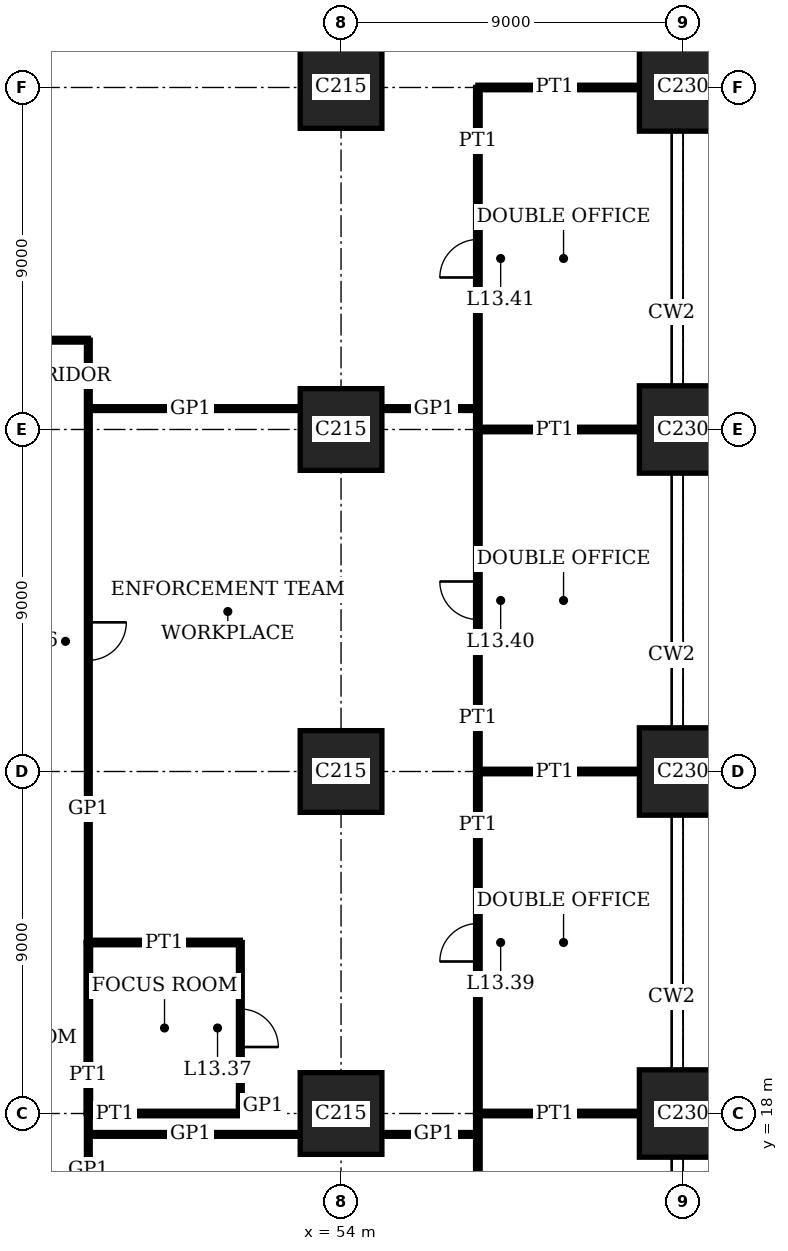
"""IFC4 building model, lengths in metres.
Left out: names, types, materials, properties, quantities, classifications, styles, units other than length and angle.
Written with IfcOpenShell. Run it as: python <this file> out.ifc"""

import sys

from ifc_helpers import new_model, si_unit, direction, frame, frame_2d, origin, origin_2d, place, context, subcontext, project, spatial, rectangle, extrude, element, fill, save


model = new_model("IFC4")
c1 = context("Model", 3, precision=1e-05, world=origin(), true_north=direction((0.0, 1.0)))
c2 = subcontext(c1, "Body", "Model", "MODEL_VIEW")
j1 = project(units=[si_unit("LENGTHUNIT", "METRE"), si_unit("PLANEANGLEUNIT", "RADIAN")], contexts=[c1])
p1 = place(None, origin())
s1 = spatial("IfcSite", under=j1, at=p1, CompositionType="ELEMENT")
p2 = place(p1, origin())
s2 = spatial("IfcBuilding", under=s1, at=p2, CompositionType="ELEMENT")
p3 = place(p2, frame((0.0, 0.0, 55.8)))
s3 = spatial("IfcBuildingStorey", under=s2, at=p3, CompositionType="ELEMENT", Elevation=55.8)
for number, where, z_axis, x_axis in (
    (1, (54.0, 18.0, 0.0), (0.0, 0.0, 1.0), (1.0, 0.0, 0.0)),
    (2, (54.0, 27.0, 0.0), (0.0, 0.0, 1.0), (1.0, 0.0, 0.0)),
    (3, (54.0, 36.0, 0.0), (0.0, 0.0, 1.0), (1.0, 0.0, 0.0)),
    (4, (54.0, 45.0, 0.0), (0.0, 0.0, 1.0), (1.0, 0.0, 0.0)),
):
    element("IfcColumn", number, at=place(p3, frame(where, z_axis=z_axis, x_axis=x_axis)), inside=s3, PredefinedType="COLUMN", context=c2, shape_type="SweptSolid", body=[
        extrude(rectangle(XDim=2.15, YDim=2.15, at=origin_2d()), origin(), (0.0, 0.0, 1.0), 4.0),
    ])
for number, where, z_axis, x_axis in (
    (5, (63.0, 18.0, 0.0), (0.0, 0.0, 1.0), (1.0, 0.0, 0.0)),
    (6, (63.0, 27.0, 0.0), (0.0, 0.0, 1.0), (1.0, 0.0, 0.0)),
    (7, (63.0, 36.0, 0.0), (0.0, 0.0, 1.0), (1.0, 0.0, 0.0)),
    (8, (63.0, 45.0, 0.0), (0.0, 0.0, 1.0), (1.0, 0.0, 0.0)),
):
    element("IfcColumn", number, at=place(p3, frame(where, z_axis=z_axis, x_axis=x_axis)), inside=s3, PredefinedType="COLUMN", context=c2, shape_type="SweptSolid", body=[
        extrude(rectangle(XDim=2.3, YDim=2.3, at=origin_2d()), origin(), (0.0, 0.0, 1.0), 4.0),
    ])
p4 = place(p3, frame((47.35, 17.45, 0.0), z_axis=(0.0, 0.0, 1.0), x_axis=(1.0, 0.0, 0.0)))
e9 = element("IfcWall", 9, at=p4, inside=s3, PredefinedType="PARTITIONING", context=c2, shape_type="SweptSolid", body=[
    extrude(rectangle(XDim=5.575, YDim=0.1, at=frame_2d((2.788, 0.0))), origin(), (0.0, 0.0, 1.0), 3.75),
])
p5 = place(p3, frame((55.075, 17.45, 0.0), z_axis=(0.0, 0.0, 1.0), x_axis=(1.0, 0.0, 0.0)))
e10 = element("IfcWall", 10, at=p5, inside=s3, PredefinedType="PARTITIONING", context=c2, shape_type="SweptSolid", body=[
    extrude(rectangle(XDim=2.535, YDim=0.1, at=frame_2d((1.268, 0.0))), origin(), (0.0, 0.0, 1.0), 3.75),
])
p6 = place(p3, frame((57.6, 18.0, 0.0), z_axis=(0.0, 0.0, 1.0), x_axis=(1.0, 0.0, 0.0)))
e11 = element("IfcWall", 11, at=p6, inside=s3, PredefinedType="PARTITIONING", context=c2, shape_type="SweptSolid", body=[
    extrude(rectangle(XDim=4.25, YDim=0.12, at=frame_2d((2.125, 0.0))), origin(), (0.0, 0.0, 1.0), 3.05),
])
p7 = place(p3, frame((47.35, 18.0, 0.0), z_axis=(0.0, 0.0, 1.0), x_axis=(1.0, 0.0, 0.0)))
e12 = element("IfcWall", 12, at=p7, inside=s3, PredefinedType="PARTITIONING", context=c2, shape_type="SweptSolid", body=[
    extrude(rectangle(XDim=4.0, YDim=0.12, at=frame_2d((2.0, 0.0))), origin(), (0.0, 0.0, 1.0), 3.05),
])
p8 = place(p3, frame((47.35, 22.5, 0.0), z_axis=(0.0, 0.0, 1.0), x_axis=(1.0, 0.0, 0.0)))
e13 = element("IfcWall", 13, at=p8, inside=s3, PredefinedType="PARTITIONING", context=c2, shape_type="SweptSolid", body=[
    extrude(rectangle(XDim=4.0, YDim=0.12, at=frame_2d((2.0, 0.0))), origin(), (0.0, 0.0, 1.0), 3.1),
])
for number, where, z_axis, x_axis in (
    (14, (57.6, 27.0, 0.0), (0.0, 0.0, 1.0), (1.0, 0.0, 0.0)),
    (15, (57.6, 36.0, 0.0), (0.0, 0.0, 1.0), (1.0, 0.0, 0.0)),
):
    element("IfcWall", number, at=place(p3, frame(where, z_axis=z_axis, x_axis=x_axis)), inside=s3, PredefinedType="PARTITIONING", context=c2, shape_type="SweptSolid", body=[
        extrude(rectangle(XDim=4.25, YDim=0.12, at=frame_2d((2.125, 0.0))), origin(), (0.0, 0.0, 1.0), 3.05),
    ])
p9 = place(p3, frame((47.35, 36.55, 0.0), z_axis=(0.0, 0.0, 1.0), x_axis=(1.0, 0.0, 0.0)))
e16 = element("IfcWall", 16, at=p9, inside=s3, PredefinedType="PARTITIONING", context=c2, shape_type="SweptSolid", body=[
    extrude(rectangle(XDim=5.575, YDim=0.1, at=frame_2d((2.788, 0.0))), origin(), (0.0, 0.0, 1.0), 3.75),
])
p10 = place(p3, frame((55.075, 36.55, 0.0), z_axis=(0.0, 0.0, 1.0), x_axis=(1.0, 0.0, 0.0)))
e17 = element("IfcWall", 17, at=p10, inside=s3, PredefinedType="PARTITIONING", context=c2, shape_type="SweptSolid", body=[
    extrude(rectangle(XDim=2.535, YDim=0.1, at=frame_2d((1.268, 0.0))), origin(), (0.0, 0.0, 1.0), 3.75),
])
p11 = place(p3, frame((22.5, 38.35, 0.0), z_axis=(0.0, 0.0, 1.0), x_axis=(1.0, 0.0, 0.0)))
e18 = element("IfcWall", 18, at=p11, inside=s3, PredefinedType="PARTITIONING", context=c2, shape_type="SweptSolid", body=[
    extrude(rectangle(XDim=24.85, YDim=0.1, at=frame_2d((12.425, 0.0))), origin(), (0.0, 0.0, 1.0), 3.75),
])
p12 = place(p3, frame((57.6, 45.0, 0.0), z_axis=(0.0, 0.0, 1.0), x_axis=(1.0, 0.0, 0.0)))
e19 = element("IfcWall", 19, at=p12, inside=s3, PredefinedType="PARTITIONING", context=c2, shape_type="SweptSolid", body=[
    extrude(rectangle(XDim=4.25, YDim=0.12, at=frame_2d((2.125, 0.0))), origin(), (0.0, 0.0, 1.0), 3.05),
])
p13 = place(p3, frame((47.35, 18.0, 0.0), z_axis=(0.0, 0.0, 1.0), x_axis=(0.0, 1.0, 0.0)))
e20 = element("IfcWall", 20, at=p13, inside=s3, PredefinedType="PARTITIONING", context=c2, shape_type="SweptSolid", body=[
    extrude(rectangle(XDim=4.5, YDim=0.12, at=frame_2d((2.25, 0.0))), origin(), (0.0, 0.0, 1.0), 3.75),
])
p14 = place(p3, frame((47.35, 15.65, 0.0), z_axis=(0.0, 0.0, 1.0), x_axis=(0.0, 1.0, 0.0)))
e21 = element("IfcWall", 21, at=p14, inside=s3, PredefinedType="PARTITIONING", context=c2, shape_type="SweptSolid", body=[
    extrude(rectangle(XDim=2.35, YDim=0.1, at=frame_2d((1.175, 0.0))), origin(), (0.0, 0.0, 1.0), 3.75),
])
p15 = place(p3, frame((47.35, 22.5, 0.0), z_axis=(0.0, 0.0, 1.0), x_axis=(0.0, 1.0, 0.0)))
e22 = element("IfcWall", 22, at=p15, inside=s3, PredefinedType="PARTITIONING", context=c2, shape_type="SweptSolid", body=[
    extrude(rectangle(XDim=15.85, YDim=0.1, at=frame_2d((7.925, 0.0))), origin(), (0.0, 0.0, 1.0), 3.75),
])
p16 = place(p15, frame((7.425, 0.0, 0.0)))
e23 = element("IfcOpeningElement", 23, at=p16, cuts=e22, PredefinedType="OPENING", context=c2, shape_type="SweptSolid", body=[
    extrude(rectangle(XDim=1.0, YDim=2.4, at=frame_2d((0.5, 1.2))), frame((0.0, 0.06, 0.0), z_axis=(0.0, -1.0, 0.0), x_axis=(1.0, 0.0, 0.0)), (0.0, 0.0, 1.0), 0.12),
])
p17 = place(p3, frame((51.35, 18.0, 0.0), z_axis=(0.0, 0.0, 1.0), x_axis=(0.0, 1.0, 0.0)))
e24 = element("IfcWall", 24, at=p17, inside=s3, PredefinedType="PARTITIONING", context=c2, shape_type="SweptSolid", body=[
    extrude(rectangle(XDim=4.5, YDim=0.1, at=frame_2d((2.25, 0.0))), origin(), (0.0, 0.0, 1.0), 3.75),
])
p18 = place(p17, frame((1.75, 0.0, 0.0)))
e25 = element("IfcOpeningElement", 25, at=p18, cuts=e24, PredefinedType="OPENING", context=c2, shape_type="SweptSolid", body=[
    extrude(rectangle(XDim=1.0, YDim=2.4, at=frame_2d((0.5, 1.2))), frame((0.0, 0.06, 0.0), z_axis=(0.0, -1.0, 0.0), x_axis=(1.0, 0.0, 0.0)), (0.0, 0.0, 1.0), 0.12),
])
p19 = place(p3, frame((57.6, 9.0, 0.0), z_axis=(0.0, 0.0, 1.0), x_axis=(0.0, 1.0, 0.0)))
e26 = element("IfcWall", 26, at=p19, inside=s3, PredefinedType="PARTITIONING", context=c2, shape_type="SweptSolid", body=[
    extrude(rectangle(XDim=9.0, YDim=0.12, at=frame_2d((4.5, 0.0))), origin(), (0.0, 0.0, 1.0), 3.75),
])
p20 = place(p19, frame((4.0, 0.0, 0.0)))
e27 = element("IfcOpeningElement", 27, at=p20, cuts=e26, PredefinedType="OPENING", context=c2, shape_type="SweptSolid", body=[
    extrude(rectangle(XDim=1.0, YDim=2.4, at=frame_2d((0.5, 1.2))), frame((0.0, 0.07, 0.0), z_axis=(0.0, -1.0, 0.0), x_axis=(1.0, 0.0, 0.0)), (0.0, 0.0, 1.0), 0.14),
])
p21 = place(p3, frame((57.6, 18.0, 0.0), z_axis=(0.0, 0.0, 1.0), x_axis=(0.0, 1.0, 0.0)))
e28 = element("IfcWall", 28, at=p21, inside=s3, PredefinedType="PARTITIONING", context=c2, shape_type="SweptSolid", body=[
    extrude(rectangle(XDim=9.0, YDim=0.12, at=frame_2d((4.5, 0.0))), origin(), (0.0, 0.0, 1.0), 3.75),
])
p22 = place(p21, frame((4.0, 0.0, 0.0)))
e29 = element("IfcOpeningElement", 29, at=p22, cuts=e28, PredefinedType="OPENING", context=c2, shape_type="SweptSolid", body=[
    extrude(rectangle(XDim=1.0, YDim=2.4, at=frame_2d((0.5, 1.2))), frame((0.0, 0.07, 0.0), z_axis=(0.0, -1.0, 0.0), x_axis=(1.0, 0.0, 0.0)), (0.0, 0.0, 1.0), 0.14),
])
p23 = place(p3, frame((57.6, 27.0, 0.0), z_axis=(0.0, 0.0, 1.0), x_axis=(0.0, 1.0, 0.0)))
e30 = element("IfcWall", 30, at=p23, inside=s3, PredefinedType="PARTITIONING", context=c2, shape_type="SweptSolid", body=[
    extrude(rectangle(XDim=9.0, YDim=0.12, at=frame_2d((4.5, 0.0))), origin(), (0.0, 0.0, 1.0), 3.75),
])
p24 = place(p23, frame((4.0, 0.0, 0.0)))
e31 = element("IfcOpeningElement", 31, at=p24, cuts=e30, PredefinedType="OPENING", context=c2, shape_type="SweptSolid", body=[
    extrude(rectangle(XDim=1.0, YDim=2.4, at=frame_2d((0.5, 1.2))), frame((0.0, 0.07, 0.0), z_axis=(0.0, -1.0, 0.0), x_axis=(1.0, 0.0, 0.0)), (0.0, 0.0, 1.0), 0.14),
])
p25 = place(p3, frame((57.6, 36.0, 0.0), z_axis=(0.0, 0.0, 1.0), x_axis=(0.0, 1.0, 0.0)))
e32 = element("IfcWall", 32, at=p25, inside=s3, PredefinedType="PARTITIONING", context=c2, shape_type="SweptSolid", body=[
    extrude(rectangle(XDim=9.0, YDim=0.12, at=frame_2d((4.5, 0.0))), origin(), (0.0, 0.0, 1.0), 3.75),
])
p26 = place(p25, frame((4.0, 0.0, 0.0)))
e33 = element("IfcOpeningElement", 33, at=p26, cuts=e32, PredefinedType="OPENING", context=c2, shape_type="SweptSolid", body=[
    extrude(rectangle(XDim=1.0, YDim=2.4, at=frame_2d((0.5, 1.2))), frame((0.0, 0.07, 0.0), z_axis=(0.0, -1.0, 0.0), x_axis=(1.0, 0.0, 0.0)), (0.0, 0.0, 1.0), 0.14),
])
p27 = place(p16, origin())
e34 = element("IfcDoor", 34, at=p27, inside=s3, OperationType="SINGLE_SWING_RIGHT", PredefinedType="DOOR", context=c2, shape_type="SweptSolid", body=[
    extrude(rectangle(XDim=1.0, YDim=2.4, at=frame_2d((0.5, 1.2))), frame((0.0, 0.02, 0.0), z_axis=(0.0, -1.0, 0.0), x_axis=(1.0, 0.0, 0.0)), (0.0, 0.0, 1.0), 0.04),
])
fill(e23, e34)
p28 = place(p18, origin())
e35 = element("IfcDoor", 35, at=p28, inside=s3, OperationType="SINGLE_SWING_LEFT", PredefinedType="DOOR", context=c2, shape_type="SweptSolid", body=[
    extrude(rectangle(XDim=1.0, YDim=2.4, at=frame_2d((0.5, 1.2))), frame((0.0, 0.02, 0.0), z_axis=(0.0, -1.0, 0.0), x_axis=(1.0, 0.0, 0.0)), (0.0, 0.0, 1.0), 0.04),
])
fill(e25, e35)
p29 = place(p22, origin())
e36 = element("IfcDoor", 36, at=p29, inside=s3, OperationType="SINGLE_SWING_RIGHT", PredefinedType="DOOR", context=c2, shape_type="SweptSolid", body=[
    extrude(rectangle(XDim=1.0, YDim=2.4, at=frame_2d((0.5, 1.2))), frame((0.0, 0.025, 0.0), z_axis=(0.0, -1.0, 0.0), x_axis=(1.0, 0.0, 0.0)), (0.0, 0.0, 1.0), 0.05),
])
fill(e29, e36)
p30 = place(p24, origin())
e37 = element("IfcDoor", 37, at=p30, inside=s3, OperationType="SINGLE_SWING_LEFT", PredefinedType="DOOR", context=c2, shape_type="SweptSolid", body=[
    extrude(rectangle(XDim=1.0, YDim=2.4, at=frame_2d((0.5, 1.2))), frame((0.0, 0.025, 0.0), z_axis=(0.0, -1.0, 0.0), x_axis=(1.0, 0.0, 0.0)), (0.0, 0.0, 1.0), 0.05),
])
fill(e31, e37)
p31 = place(p26, origin())
e38 = element("IfcDoor", 38, at=p31, inside=s3, OperationType="SINGLE_SWING_RIGHT", PredefinedType="DOOR", context=c2, shape_type="SweptSolid", body=[
    extrude(rectangle(XDim=1.0, YDim=2.4, at=frame_2d((0.5, 1.2))), frame((0.0, 0.025, 0.0), z_axis=(0.0, -1.0, 0.0), x_axis=(1.0, 0.0, 0.0)), (0.0, 0.0, 1.0), 0.05),
])
fill(e33, e38)
save(model, sys.argv[1])
